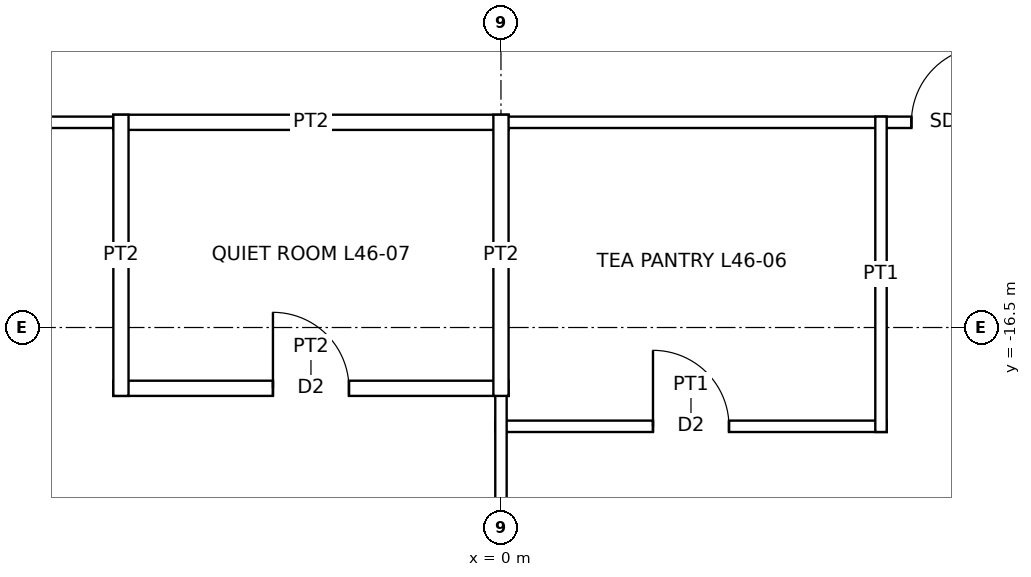
"""IFC4 building model, lengths in metres.
Left out: names, types, materials, properties, quantities, classifications, styles, units other than length and angle.
Written with IfcOpenShell. Run it as: python <this file> out.ifc"""

import sys

from ifc_helpers import new_model, si_unit, direction, frame, frame_2d, origin, place, context, subcontext, project, spatial, rectangle, extrude, element, fill, save


model = new_model("IFC4")
c1 = context("Model", 3, precision=1e-05, world=origin(), true_north=direction((0.0, 1.0)))
c2 = subcontext(c1, "Body", "Model", "MODEL_VIEW")
j1 = project(units=[si_unit("LENGTHUNIT", "METRE"), si_unit("PLANEANGLEUNIT", "RADIAN")], contexts=[c1])
p1 = place(None, origin())
s1 = spatial("IfcSite", under=j1, at=p1, CompositionType="ELEMENT")
p2 = place(p1, origin())
s2 = spatial("IfcBuilding", under=s1, at=p2, CompositionType="ELEMENT")
p3 = place(p2, frame((0.0, 0.0, 217.9)))
s3 = spatial("IfcBuildingStorey", under=s2, at=p3, CompositionType="ELEMENT", Elevation=217.9)
p4 = place(p3, frame((-0.075, -17.8, 0.0), z_axis=(0.0, 0.0, 1.0), x_axis=(1.0, 0.0, 0.0)))
e1 = element("IfcWall", 1, at=p4, inside=s3, PredefinedType="PARTITIONING", context=c2, shape_type="SweptSolid", body=[
    extrude(rectangle(XDim=5.15, YDim=0.15, at=frame_2d((2.575, 0.0))), origin(), (0.0, 0.0, 1.0), 3.85),
])
p5 = place(p4, frame((2.075, 0.0, 0.0)))
e2 = element("IfcOpeningElement", 2, at=p5, cuts=e1, PredefinedType="OPENING", context=c2, shape_type="SweptSolid", body=[
    extrude(rectangle(XDim=1.0, YDim=2.1, at=frame_2d((0.5, 1.05))), frame((0.0, 0.085, 0.0), z_axis=(0.0, -1.0, 0.0), x_axis=(1.0, 0.0, 0.0)), (0.0, 0.0, 1.0), 0.17),
])
p6 = place(p3, frame((-5.1, -17.3, 0.0), z_axis=(0.0, 0.0, 1.0), x_axis=(1.0, 0.0, 0.0)))
e3 = element("IfcWall", 3, at=p6, inside=s3, PredefinedType="PARTITIONING", context=c2, shape_type="SweptSolid", body=[
    extrude(rectangle(XDim=5.2, YDim=0.2, at=frame_2d((2.6, 0.0))), origin(), (0.0, 0.0, 1.0), 3.85),
])
p7 = place(p6, frame((2.1, 0.0, 0.0)))
e4 = element("IfcOpeningElement", 4, at=p7, cuts=e3, PredefinedType="OPENING", context=c2, shape_type="SweptSolid", body=[
    extrude(rectangle(XDim=1.0, YDim=2.1, at=frame_2d((0.5, 1.05))), frame((0.0, 0.11, 0.0), z_axis=(0.0, -1.0, 0.0), x_axis=(1.0, 0.0, 0.0)), (0.0, 0.0, 1.0), 0.22),
])
p8 = place(p3, frame((-13.875, -13.8, 0.0), z_axis=(0.0, 0.0, 1.0), x_axis=(1.0, 0.0, 0.0)))
e5 = element("IfcWall", 5, at=p8, inside=s3, PredefinedType="PARTITIONING", context=c2, shape_type="SweptSolid", body=[
    extrude(rectangle(XDim=8.95, YDim=0.15, at=frame_2d((4.475, 0.0))), origin(), (0.0, 0.0, 1.0), 3.85),
])
p9 = place(p8, frame((3.975, 0.0, 0.0)))
e6 = element("IfcOpeningElement", 6, at=p9, cuts=e5, PredefinedType="OPENING", context=c2, shape_type="SweptSolid", body=[
    extrude(rectangle(XDim=1.0, YDim=2.4, at=frame_2d((0.5, 1.2))), frame((0.0, 0.085, 0.0), z_axis=(0.0, -1.0, 0.0), x_axis=(1.0, 0.0, 0.0)), (0.0, 0.0, 1.0), 0.17),
])
p10 = place(p3, frame((-5.1, -13.8, 0.0), z_axis=(0.0, 0.0, 1.0), x_axis=(1.0, 0.0, 0.0)))
e7 = element("IfcWall", 7, at=p10, inside=s3, PredefinedType="PARTITIONING", context=c2, shape_type="SweptSolid", body=[
    extrude(rectangle(XDim=5.2, YDim=0.2, at=frame_2d((2.6, 0.0))), origin(), (0.0, 0.0, 1.0), 3.85),
])
p11 = place(p3, frame((-0.075, -13.8, 0.0), z_axis=(0.0, 0.0, 1.0), x_axis=(1.0, 0.0, 0.0)))
e8 = element("IfcWall", 8, at=p11, inside=s3, PredefinedType="PARTITIONING", context=c2, shape_type="SweptSolid", body=[
    extrude(rectangle(XDim=13.95, YDim=0.15, at=frame_2d((6.975, 0.0))), origin(), (0.0, 0.0, 1.0), 3.85),
])
p12 = place(p11, frame((5.475, 0.0, 0.0)))
e9 = element("IfcOpeningElement", 9, at=p12, cuts=e8, PredefinedType="OPENING", context=c2, shape_type="SweptSolid", body=[
    extrude(rectangle(XDim=1.0, YDim=2.4, at=frame_2d((0.5, 1.2))), frame((0.0, 0.085, 0.0), z_axis=(0.0, -1.0, 0.0), x_axis=(1.0, 0.0, 0.0)), (0.0, 0.0, 1.0), 0.17),
])
p13 = place(p3, frame((-5.0, -17.4, 0.0), z_axis=(0.0, 0.0, 1.0), x_axis=(0.0, 1.0, 0.0)))
e10 = element("IfcWall", 10, at=p13, inside=s3, PredefinedType="PARTITIONING", context=c2, shape_type="SweptSolid", body=[
    extrude(rectangle(XDim=3.7, YDim=0.2, at=frame_2d((1.85, 0.0))), origin(), (0.0, 0.0, 1.0), 3.85),
])
p14 = place(p3, frame((0.0, -20.99, 0.0), z_axis=(0.0, 0.0, 1.0), x_axis=(0.0, 1.0, 0.0)))
e11 = element("IfcWall", 11, at=p14, inside=s3, PredefinedType="PARTITIONING", context=c2, shape_type="SweptSolid", body=[
    extrude(rectangle(XDim=3.765, YDim=0.15, at=frame_2d((1.882, 0.0))), origin(), (0.0, 0.0, 1.0), 3.238),
])
p15 = place(p3, frame((0.0, -17.4, 0.0), z_axis=(0.0, 0.0, 1.0), x_axis=(0.0, 1.0, 0.0)))
e12 = element("IfcWall", 12, at=p15, inside=s3, PredefinedType="PARTITIONING", context=c2, shape_type="SweptSolid", body=[
    extrude(rectangle(XDim=3.7, YDim=0.2, at=frame_2d((1.85, 0.0))), origin(), (0.0, 0.0, 1.0), 3.238),
])
p16 = place(p3, frame((5.0, -17.875, 0.0), z_axis=(0.0, 0.0, 1.0), x_axis=(0.0, 1.0, 0.0)))
e13 = element("IfcWall", 13, at=p16, inside=s3, PredefinedType="PARTITIONING", context=c2, shape_type="SweptSolid", body=[
    extrude(rectangle(XDim=4.15, YDim=0.15, at=frame_2d((2.075, 0.0))), origin(), (0.0, 0.0, 1.0), 3.85),
])
p17 = place(p5, origin())
e14 = element("IfcDoor", 14, at=p17, inside=s3, OperationType="SINGLE_SWING_LEFT", PredefinedType="DOOR", context=c2, shape_type="SweptSolid", body=[
    extrude(rectangle(XDim=1.0, YDim=2.1, at=frame_2d((0.5, 1.05))), frame((0.0, 0.025, 0.0), z_axis=(0.0, -1.0, 0.0), x_axis=(1.0, 0.0, 0.0)), (0.0, 0.0, 1.0), 0.05),
])
fill(e2, e14)
p18 = place(p7, origin())
e15 = element("IfcDoor", 15, at=p18, inside=s3, OperationType="SINGLE_SWING_LEFT", PredefinedType="DOOR", context=c2, shape_type="SweptSolid", body=[
    extrude(rectangle(XDim=1.0, YDim=2.1, at=frame_2d((0.5, 1.05))), frame((0.0, 0.025, 0.0), z_axis=(0.0, -1.0, 0.0), x_axis=(1.0, 0.0, 0.0)), (0.0, 0.0, 1.0), 0.05),
])
fill(e4, e15)
p19 = place(p12, origin())
e16 = element("IfcDoor", 16, at=p19, inside=s3, OperationType="SINGLE_SWING_RIGHT", PredefinedType="DOOR", context=c2, shape_type="SweptSolid", body=[
    extrude(rectangle(XDim=1.0, YDim=2.4, at=frame_2d((0.5, 1.2))), frame((0.0, 0.025, 0.0), z_axis=(0.0, -1.0, 0.0), x_axis=(1.0, 0.0, 0.0)), (0.0, 0.0, 1.0), 0.05),
])
fill(e9, e16)
save(model, sys.argv[1])
